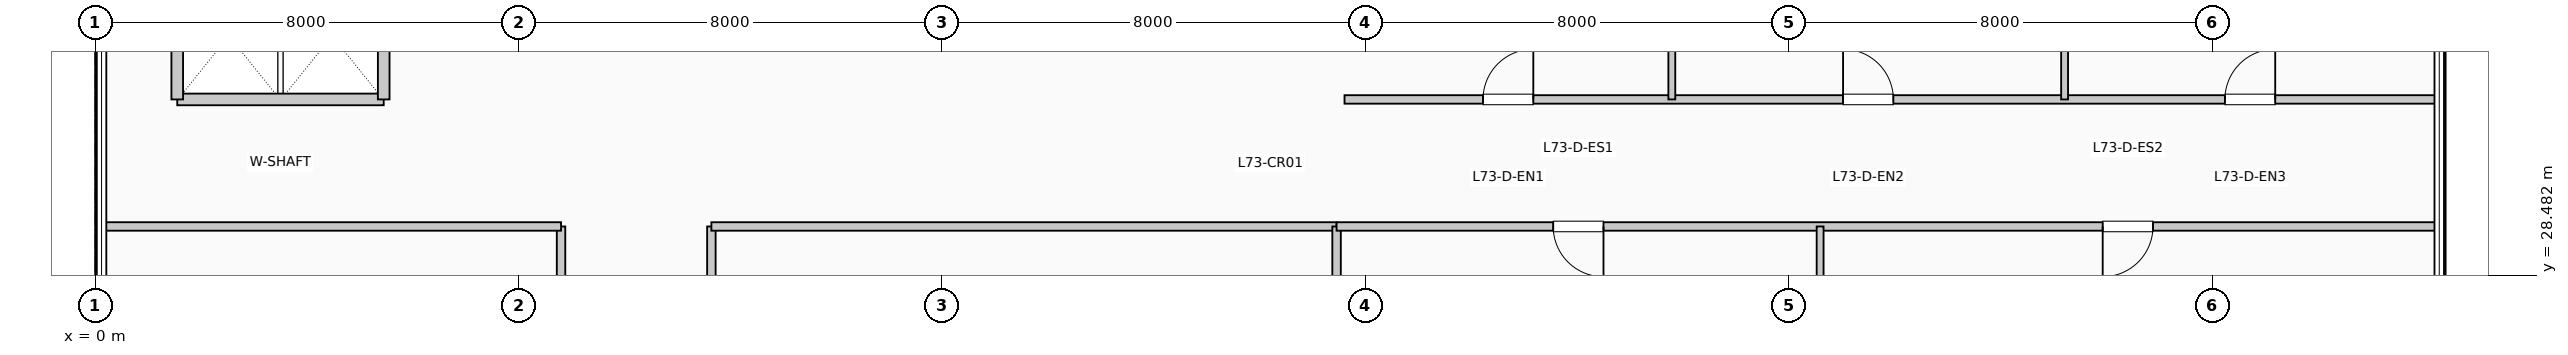
"""IFC4 building model, lengths in metres.
Left out: names, types, materials, properties, quantities, classifications, styles, units other than length and angle.
Written with IfcOpenShell. Run it as: python <this file> out.ifc"""

import sys

from ifc_helpers import new_model, si_unit, direction, frame, frame_2d, origin, place, context, subcontext, project, spatial, rectangle, extrude, element, fill, save


model = new_model("IFC4")
c1 = context("Model", 3, precision=1e-05, world=origin(), true_north=direction((0.0, 1.0)))
c2 = subcontext(c1, "Body", "Model", "MODEL_VIEW")
j1 = project(units=[si_unit("LENGTHUNIT", "METRE"), si_unit("PLANEANGLEUNIT", "RADIAN")], contexts=[c1])
p1 = place(None, origin())
s1 = spatial("IfcSite", under=j1, at=p1, CompositionType="ELEMENT")
p2 = place(p1, origin())
s2 = spatial("IfcBuilding", under=s1, at=p2, CompositionType="ELEMENT")
p3 = place(p2, frame((0.0, 0.0, 299.97)))
s3 = spatial("IfcBuildingStorey", under=s2, at=p3, CompositionType="ELEMENT", Elevation=299.97)
p4 = place(p3, frame((1.55, 31.8, 0.0), z_axis=(0.0, 0.0, 1.0), x_axis=(1.0, 0.0, 0.0)))
e1 = element("IfcWall", 1, at=p4, inside=s3, PredefinedType="PARTITIONING", context=c2, shape_type="SweptSolid", body=[
    extrude(rectangle(XDim=3.9, YDim=0.22, at=frame_2d((1.95, 0.0))), origin(), (0.0, 0.0, 1.0), 3.74),
])
for number, where, z_axis, x_axis in (
    (2, (1.55, 31.8, 0.0), (0.0, 0.0, 1.0), (0.0, 1.0, 0.0)),
    (3, (5.45, 31.8, 0.0), (0.0, 0.0, 1.0), (0.0, 1.0, 0.0)),
):
    element("IfcWall", number, at=place(p3, frame(where, z_axis=z_axis, x_axis=x_axis)), inside=s3, PredefinedType="PARTITIONING", context=c2, shape_type="SweptSolid", body=[
        extrude(rectangle(XDim=2.38, YDim=0.22, at=frame_2d((1.19, 0.0))), origin(), (0.0, 0.0, 1.0), 3.74),
    ])
p5 = place(p3, frame((8.8, 12.6, 0.0), z_axis=(0.0, 0.0, 1.0), x_axis=(0.0, 1.0, 0.0)))
e4 = element("IfcWall", 4, at=p5, inside=s3, PredefinedType="PARTITIONING", context=c2, shape_type="SweptSolid", body=[
    extrude(rectangle(XDim=16.8, YDim=0.16, at=frame_2d((8.4, 0.0))), origin(), (0.0, 0.0, 1.0), 3.74),
])
p6 = place(p5, frame((4.339, 0.0, 0.0), z_axis=(0.0, 0.0, 1.0), x_axis=(-1.0, 0.0, 0.0)))
e5 = element("IfcOpeningElement", 5, at=p6, cuts=e4, PredefinedType="OPENING", context=c2, shape_type="SweptSolid", body=[
    extrude(rectangle(XDim=0.95, YDim=2.15, at=frame_2d((0.475, 1.075))), frame((0.0, 0.09, 0.0), z_axis=(0.0, -1.0, 0.0), x_axis=(1.0, 0.0, 0.0)), (0.0, 0.0, 1.0), 0.18),
])
p7 = place(p5, frame((12.739, 0.0, 0.0), z_axis=(0.0, 0.0, 1.0), x_axis=(-1.0, 0.0, 0.0)))
e6 = element("IfcOpeningElement", 6, at=p7, cuts=e4, PredefinedType="OPENING", context=c2, shape_type="SweptSolid", body=[
    extrude(rectangle(XDim=0.95, YDim=2.15, at=frame_2d((0.475, 1.075))), frame((0.0, 0.09, 0.0), z_axis=(0.0, -1.0, 0.0), x_axis=(1.0, 0.0, 0.0)), (0.0, 0.0, 1.0), 0.18),
])
p8 = place(p3, frame((11.64, 12.6, 0.0), z_axis=(0.0, 0.0, 1.0), x_axis=(0.0, 1.0, 0.0)))
e7 = element("IfcWall", 7, at=p8, inside=s3, PredefinedType="PARTITIONING", context=c2, shape_type="SweptSolid", body=[
    extrude(rectangle(XDim=16.8, YDim=0.16, at=frame_2d((8.4, 0.0))), origin(), (0.0, 0.0, 1.0), 3.175),
])
p9 = place(p8, frame((3.381, 0.0, 0.0)))
e8 = element("IfcOpeningElement", 8, at=p9, cuts=e7, PredefinedType="OPENING", context=c2, shape_type="SweptSolid", body=[
    extrude(rectangle(XDim=0.95, YDim=2.15, at=frame_2d((0.475, 1.075))), frame((0.0, 0.09, 0.0), z_axis=(0.0, -1.0, 0.0), x_axis=(1.0, 0.0, 0.0)), (0.0, 0.0, 1.0), 0.18),
])
p10 = place(p8, frame((7.593, 0.0, 0.0)))
e9 = element("IfcOpeningElement", 9, at=p10, cuts=e7, PredefinedType="OPENING", context=c2, shape_type="SweptSolid", body=[
    extrude(rectangle(XDim=0.95, YDim=2.15, at=frame_2d((0.475, 1.075))), frame((0.0, 0.09, 0.0), z_axis=(0.0, -1.0, 0.0), x_axis=(1.0, 0.0, 0.0)), (0.0, 0.0, 1.0), 0.18),
])
p11 = place(p8, frame((13.637, 0.0, 0.0)))
e10 = element("IfcOpeningElement", 10, at=p11, cuts=e7, PredefinedType="OPENING", context=c2, shape_type="SweptSolid", body=[
    extrude(rectangle(XDim=0.95, YDim=2.15, at=frame_2d((0.475, 1.075))), frame((0.0, 0.09, 0.0), z_axis=(0.0, -1.0, 0.0), x_axis=(1.0, 0.0, 0.0)), (0.0, 0.0, 1.0), 0.18),
])
p12 = place(p3, frame((0.19, 29.4, 0.0), z_axis=(0.0, 0.0, 1.0), x_axis=(1.0, 0.0, 0.0)))
e11 = element("IfcWall", 11, at=p12, inside=s3, PredefinedType="PARTITIONING", context=c2, shape_type="SweptSolid", body=[
    extrude(rectangle(XDim=8.61, YDim=0.16, at=frame_2d((4.305, 0.0))), origin(), (0.0, 0.0, 1.0), 3.425),
])
p13 = place(p3, frame((11.64, 29.4, 0.0), z_axis=(0.0, 0.0, 1.0), x_axis=(1.0, 0.0, 0.0)))
e12 = element("IfcWall", 12, at=p13, inside=s3, PredefinedType="PARTITIONING", context=c2, shape_type="SweptSolid", body=[
    extrude(rectangle(XDim=11.81, YDim=0.16, at=frame_2d((5.905, 0.0))), origin(), (0.0, 0.0, 1.0), 3.425),
])
p14 = place(p3, frame((23.45, 5.99, 0.0), z_axis=(0.0, 0.0, 1.0), x_axis=(0.0, 1.0, 0.0)))
e13 = element("IfcWall", 13, at=p14, inside=s3, PredefinedType="PARTITIONING", context=c2, shape_type="SweptSolid", body=[
    extrude(rectangle(XDim=23.41, YDim=0.16, at=frame_2d((11.705, 0.0))), origin(), (0.0, 0.0, 1.0), 3.175),
])
p15 = place(p3, frame((23.45, 29.4, 0.0), z_axis=(0.0, 0.0, 1.0), x_axis=(1.0, 0.0, 0.0)))
e14 = element("IfcWall", 14, at=p15, inside=s3, PredefinedType="PARTITIONING", context=c2, shape_type="SweptSolid", body=[
    extrude(rectangle(XDim=20.76, YDim=0.16, at=frame_2d((10.38, 0.0))), origin(), (0.0, 0.0, 1.0), 3.425),
])
p16 = place(p15, frame((5.042, 0.0, 0.0), z_axis=(0.0, 0.0, 1.0), x_axis=(-1.0, 0.0, 0.0)))
e15 = element("IfcOpeningElement", 15, at=p16, cuts=e14, PredefinedType="OPENING", context=c2, shape_type="SweptSolid", body=[
    extrude(rectangle(XDim=0.95, YDim=2.15, at=frame_2d((0.475, 1.075))), frame((0.0, 0.09, 0.0), z_axis=(0.0, -1.0, 0.0), x_axis=(1.0, 0.0, 0.0)), (0.0, 0.0, 1.0), 0.18),
])
p17 = place(p15, frame((15.422, 0.0, 0.0), z_axis=(0.0, 0.0, 1.0), x_axis=(-1.0, 0.0, 0.0)))
e16 = element("IfcOpeningElement", 16, at=p17, cuts=e14, PredefinedType="OPENING", context=c2, shape_type="SweptSolid", body=[
    extrude(rectangle(XDim=0.95, YDim=2.15, at=frame_2d((0.475, 1.075))), frame((0.0, 0.09, 0.0), z_axis=(0.0, -1.0, 0.0), x_axis=(1.0, 0.0, 0.0)), (0.0, 0.0, 1.0), 0.18),
])
p18 = place(p3, frame((23.6, 31.8, 0.0), z_axis=(0.0, 0.0, 1.0), x_axis=(1.0, 0.0, 0.0)))
e17 = element("IfcWall", 17, at=p18, inside=s3, PredefinedType="PARTITIONING", context=c2, shape_type="SweptSolid", body=[
    extrude(rectangle(XDim=20.61, YDim=0.16, at=frame_2d((10.305, 0.0))), origin(), (0.0, 0.0, 1.0), 3.74),
])
p19 = place(p18, frame((2.616, 0.0, 0.0)))
e18 = element("IfcOpeningElement", 18, at=p19, cuts=e17, PredefinedType="OPENING", context=c2, shape_type="SweptSolid", body=[
    extrude(rectangle(XDim=0.95, YDim=2.15, at=frame_2d((0.475, 1.075))), frame((0.0, 0.09, 0.0), z_axis=(0.0, -1.0, 0.0), x_axis=(1.0, 0.0, 0.0)), (0.0, 0.0, 1.0), 0.18),
])
p20 = place(p18, frame((9.418, 0.0, 0.0)))
e19 = element("IfcOpeningElement", 19, at=p20, cuts=e17, PredefinedType="OPENING", context=c2, shape_type="SweptSolid", body=[
    extrude(rectangle(XDim=0.95, YDim=2.15, at=frame_2d((0.475, 1.075))), frame((0.0, 0.09, 0.0), z_axis=(0.0, -1.0, 0.0), x_axis=(1.0, 0.0, 0.0)), (0.0, 0.0, 1.0), 0.18),
])
p21 = place(p18, frame((16.631, 0.0, 0.0)))
e20 = element("IfcOpeningElement", 20, at=p21, cuts=e17, PredefinedType="OPENING", context=c2, shape_type="SweptSolid", body=[
    extrude(rectangle(XDim=0.95, YDim=2.15, at=frame_2d((0.475, 1.075))), frame((0.0, 0.09, 0.0), z_axis=(0.0, -1.0, 0.0), x_axis=(1.0, 0.0, 0.0)), (0.0, 0.0, 1.0), 0.18),
])
p22 = place(p3, frame((32.584, 25.19, 0.0), z_axis=(0.0, 0.0, 1.0), x_axis=(0.0, 1.0, 0.0)))
e21 = element("IfcWall", 21, at=p22, inside=s3, PredefinedType="PARTITIONING", context=c2, shape_type="SweptSolid", body=[
    extrude(rectangle(XDim=4.21, YDim=0.13, at=frame_2d((2.105, 0.0))), origin(), (0.0, 0.0, 1.0), 3.74),
])
for number, where, z_axis, x_axis in (
    (22, (29.783, 31.8, 0.0), (0.0, 0.0, 1.0), (0.0, 1.0, 0.0)),
    (23, (37.203, 31.8, 0.0), (0.0, 0.0, 1.0), (0.0, 1.0, 0.0)),
):
    element("IfcWall", number, at=place(p3, frame(where, z_axis=z_axis, x_axis=x_axis)), inside=s3, PredefinedType="PARTITIONING", context=c2, shape_type="SweptSolid", body=[
        extrude(rectangle(XDim=14.01, YDim=0.13, at=frame_2d((7.005, 0.0))), origin(), (0.0, 0.0, 1.0), 3.74),
    ])
p23 = place(p16, origin())
e24 = element("IfcDoor", 24, at=p23, inside=s3, OperationType="SINGLE_SWING_RIGHT", PredefinedType="DOOR", context=c2, shape_type="SweptSolid", body=[
    extrude(rectangle(XDim=0.95, YDim=2.15, at=frame_2d((0.475, 1.075))), frame((0.0, 0.025, 0.0), z_axis=(0.0, -1.0, 0.0), x_axis=(1.0, 0.0, 0.0)), (0.0, 0.0, 1.0), 0.05),
])
fill(e15, e24)
p24 = place(p17, origin())
e25 = element("IfcDoor", 25, at=p24, inside=s3, OperationType="SINGLE_SWING_LEFT", PredefinedType="DOOR", context=c2, shape_type="SweptSolid", body=[
    extrude(rectangle(XDim=0.95, YDim=2.15, at=frame_2d((0.475, 1.075))), frame((0.0, 0.025, 0.0), z_axis=(0.0, -1.0, 0.0), x_axis=(1.0, 0.0, 0.0)), (0.0, 0.0, 1.0), 0.05),
])
fill(e16, e25)
p25 = place(p19, origin())
e26 = element("IfcDoor", 26, at=p25, inside=s3, OperationType="SINGLE_SWING_RIGHT", PredefinedType="DOOR", context=c2, shape_type="SweptSolid", body=[
    extrude(rectangle(XDim=0.95, YDim=2.15, at=frame_2d((0.475, 1.075))), frame((0.0, 0.025, 0.0), z_axis=(0.0, -1.0, 0.0), x_axis=(1.0, 0.0, 0.0)), (0.0, 0.0, 1.0), 0.05),
])
fill(e18, e26)
p26 = place(p20, origin())
e27 = element("IfcDoor", 27, at=p26, inside=s3, OperationType="SINGLE_SWING_LEFT", PredefinedType="DOOR", context=c2, shape_type="SweptSolid", body=[
    extrude(rectangle(XDim=0.95, YDim=2.15, at=frame_2d((0.475, 1.075))), frame((0.0, 0.025, 0.0), z_axis=(0.0, -1.0, 0.0), x_axis=(1.0, 0.0, 0.0)), (0.0, 0.0, 1.0), 0.05),
])
fill(e19, e27)
p27 = place(p21, origin())
e28 = element("IfcDoor", 28, at=p27, inside=s3, OperationType="SINGLE_SWING_RIGHT", PredefinedType="DOOR", context=c2, shape_type="SweptSolid", body=[
    extrude(rectangle(XDim=0.95, YDim=2.15, at=frame_2d((0.475, 1.075))), frame((0.0, 0.025, 0.0), z_axis=(0.0, -1.0, 0.0), x_axis=(1.0, 0.0, 0.0)), (0.0, 0.0, 1.0), 0.05),
])
fill(e20, e28)
save(model, sys.argv[1])
